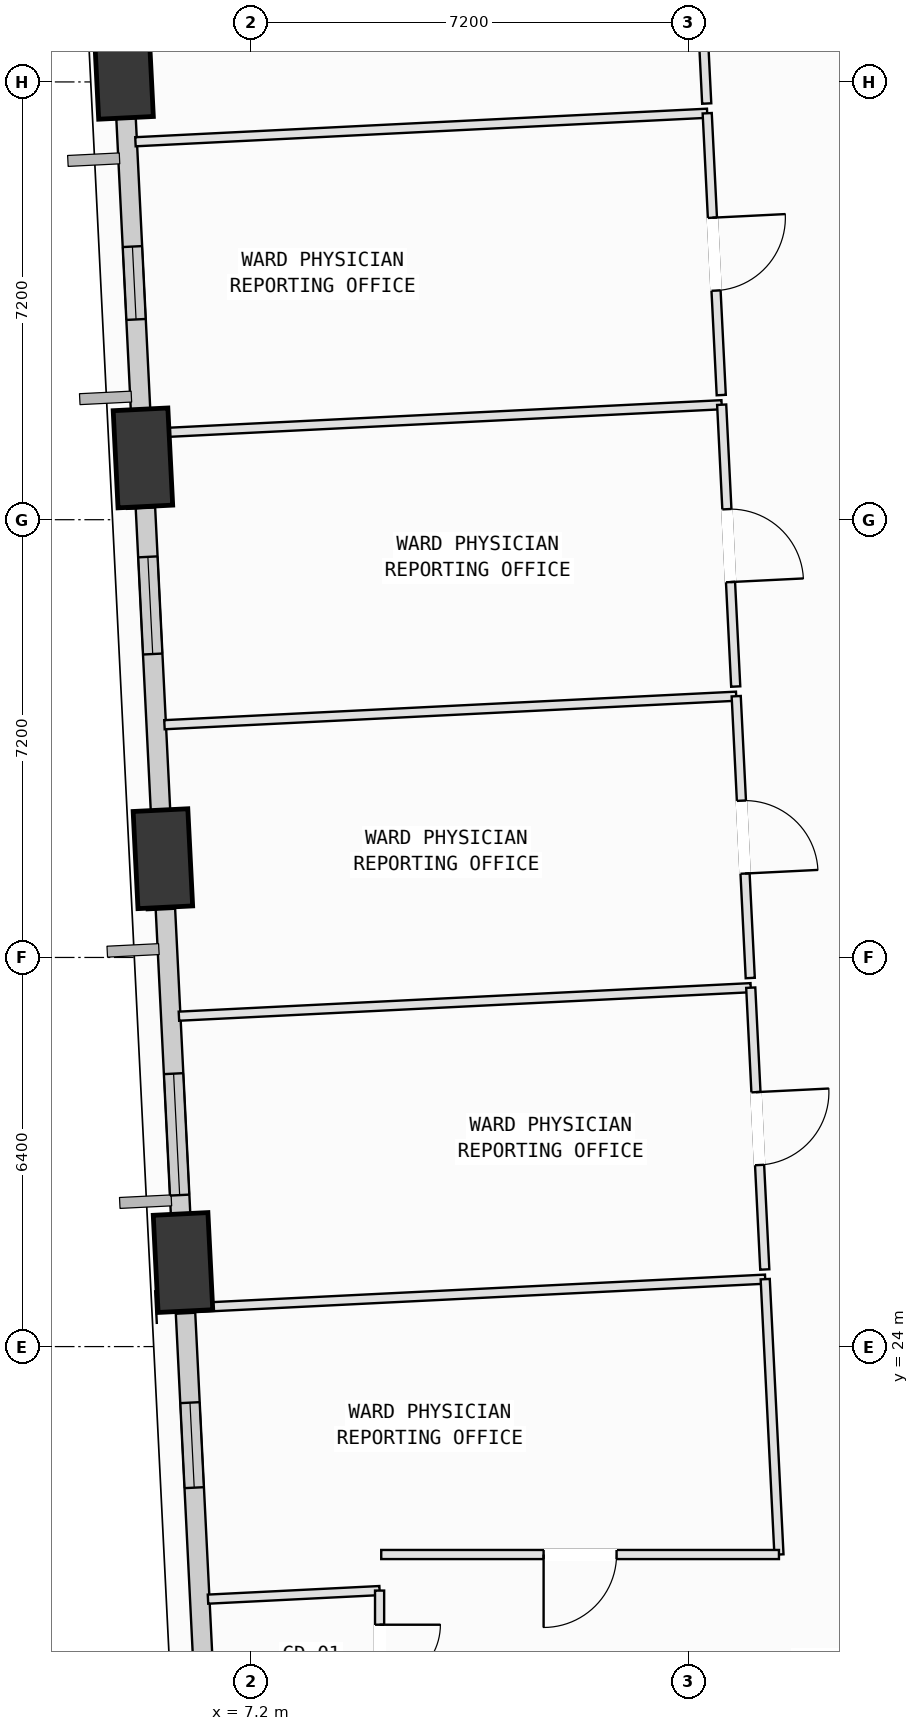
"""IFC4 building model, lengths in metres.
Left out: names, types, materials, properties, quantities, classifications, styles, units other than length and angle.
Written with IfcOpenShell. Run it as: python <this file> out.ifc"""

import sys

from ifc_helpers import new_model, si_unit, direction, frame, frame_2d, origin, origin_2d, place, context, subcontext, project, spatial, rectangle, extrude, element, fill, save


model = new_model("IFC4")
c1 = context("Model", 3, precision=1e-05, world=origin(), true_north=direction((0.0, 1.0)))
c2 = subcontext(c1, "Body", "Model", "MODEL_VIEW")
j1 = project(units=[si_unit("LENGTHUNIT", "METRE"), si_unit("PLANEANGLEUNIT", "RADIAN")], contexts=[c1])
p1 = place(None, origin())
s1 = spatial("IfcSite", under=j1, at=p1, CompositionType="ELEMENT")
p2 = place(p1, origin())
s2 = spatial("IfcBuilding", under=s1, at=p2, CompositionType="ELEMENT")
p3 = place(p2, frame((0.0, 0.0, 35.0)))
s3 = spatial("IfcBuildingStorey", under=s2, at=p3, CompositionType="ELEMENT", Elevation=35.0)
p4 = place(p3, frame((5.11, 45.008, 0.002), z_axis=(-0.081918966219, -0.117588479185, 0.989677842804), x_axis=(0.52422320017, 0.839465927074, 0.143132783408)))
e1 = element("IfcColumn", 1, at=p4, inside=s3, PredefinedType="COLUMN", context=c2, shape_type="SweptSolid", body=[
    extrude(rectangle(XDim=1.6, YDim=0.9, at=origin_2d()), origin(), (0.0, 0.0, 1.0), 4.038),
])
p5 = place(p3, frame((5.428, 38.616, 0.002), z_axis=(-0.055791389838, -0.116307783376, 0.991645007221), x_axis=(0.383527593879, 0.914498520054, 0.128837267713)))
e2 = element("IfcColumn", 2, at=p5, inside=s3, PredefinedType="COLUMN", context=c2, shape_type="SweptSolid", body=[
    extrude(rectangle(XDim=1.6, YDim=0.9, at=origin_2d()), origin(), (0.0, 0.0, 1.0), 4.03),
])
p6 = place(p3, frame((5.756, 32.024, 0.002), z_axis=(-0.028812242657, -0.11488502651, 0.992960867989), x_axis=(0.193019646843, 0.974037670364, 0.118296376293)))
e3 = element("IfcColumn", 3, at=p6, inside=s3, PredefinedType="COLUMN", context=c2, shape_type="SweptSolid", body=[
    extrude(rectangle(XDim=1.6, YDim=0.9, at=origin_2d()), origin(), (0.0, 0.0, 1.0), 4.025),
])
p7 = place(p3, frame((6.087, 25.383, 0.002), z_axis=(-0.001456651927, -0.113315381125, 0.993558001611), x_axis=(-0.036962080994, 0.99288622538, 0.113184575006)))
e4 = element("IfcColumn", 4, at=p7, inside=s3, PredefinedType="COLUMN", context=c2, shape_type="SweptSolid", body=[
    extrude(rectangle(XDim=1.6, YDim=0.9, at=origin_2d()), origin(), (0.0, 0.0, 1.0), 4.022),
])
p8 = place(p3, frame((5.293, 45.269, 0.0), z_axis=(0.0, 0.0, 1.0), x_axis=(0.574655096794, 0.818395698748, 0.0)))
e5 = element("IfcWall", 5, at=p8, inside=s3, PredefinedType="SOLIDWALL", context=c2, shape_type="SweptSolid", body=[
    extrude(rectangle(XDim=3.666, YDim=0.32, at=frame_2d((1.833, 0.0))), origin(), (0.0, 0.0, 1.0), 3.165),
])
p9 = place(p3, frame((5.41, 38.982, 0.0), z_axis=(0.0, 0.0, 1.0), x_axis=(-0.049688162192, 0.998764780385, 0.0)))
e6 = element("IfcWall", 6, at=p9, inside=s3, PredefinedType="SOLIDWALL", context=c2, shape_type="SweptSolid", body=[
    extrude(rectangle(XDim=5.223, YDim=0.32, at=frame_2d((2.611, 0.0))), origin(), (0.0, 0.0, 1.0), 3.165),
])
p10 = place(p9, frame((1.914, 0.0, 0.75)))
e7 = element("IfcOpeningElement", 7, at=p10, cuts=e6, PredefinedType="OPENING", context=c2, shape_type="SweptSolid", body=[
    extrude(rectangle(XDim=1.2, YDim=1.75, at=frame_2d((0.6, 0.875))), frame((0.0, 0.17, 0.0), z_axis=(0.0, -1.0, 0.0), x_axis=(1.0, 0.0, 0.0)), (0.0, 0.0, 1.0), 0.34),
])
p11 = place(p3, frame((5.738, 32.4, 0.0), z_axis=(0.0, 0.0, 1.0), x_axis=(-0.049773021821, 0.998760555037, 0.0)))
e8 = element("IfcWall", 8, at=p11, inside=s3, PredefinedType="SOLIDWALL", context=c2, shape_type="SweptSolid", body=[
    extrude(rectangle(XDim=5.4, YDim=0.32, at=frame_2d((2.7, 0.0))), origin(), (0.0, 0.0, 1.0), 3.165),
])
p12 = place(p11, frame((2.995, 0.0, 0.75)))
e9 = element("IfcOpeningElement", 9, at=p12, cuts=e8, PredefinedType="OPENING", context=c2, shape_type="SweptSolid", body=[
    extrude(rectangle(XDim=1.6, YDim=1.95, at=frame_2d((0.8, 0.975))), frame((0.0, 0.17, 0.0), z_axis=(0.0, -1.0, 0.0), x_axis=(1.0, 0.0, 0.0)), (0.0, 0.0, 1.0), 0.34),
])
p13 = place(p3, frame((6.068, 25.762, 0.0), z_axis=(0.0, 0.0, 1.0), x_axis=(-0.049742813076, 0.998762060026, 0.0)))
e10 = element("IfcWall", 10, at=p13, inside=s3, PredefinedType="SOLIDWALL", context=c2, shape_type="SweptSolid", body=[
    extrude(rectangle(XDim=5.438, YDim=0.32, at=frame_2d((2.719, 0.0))), origin(), (0.0, 0.0, 1.0), 3.165),
])
p14 = place(p13, frame((0.73, 0.0, 0.75)))
e11 = element("IfcOpeningElement", 11, at=p14, cuts=e10, PredefinedType="OPENING", context=c2, shape_type="SweptSolid", body=[
    extrude(rectangle(XDim=2.0, YDim=1.95, at=frame_2d((1.0, 0.975))), frame((0.0, 0.17, 0.0), z_axis=(0.0, -1.0, 0.0), x_axis=(1.0, 0.0, 0.0)), (0.0, 0.0, 1.0), 0.34),
])
p15 = place(p3, frame((6.483, 17.421, 0.0), z_axis=(0.0, 0.0, 1.0), x_axis=(-0.049743098397, 0.998762045816, 0.0)))
e12 = element("IfcWall", 12, at=p15, inside=s3, PredefinedType="SOLIDWALL", context=c2, shape_type="SweptSolid", body=[
    extrude(rectangle(XDim=7.136, YDim=0.32, at=frame_2d((3.568, 0.0))), origin(), (0.0, 0.0, 1.0), 3.165),
])
p16 = place(p15, frame((4.264, 0.0, 0.75)))
e13 = element("IfcOpeningElement", 13, at=p16, cuts=e12, PredefinedType="OPENING", context=c2, shape_type="SweptSolid", body=[
    extrude(rectangle(XDim=1.4, YDim=1.85, at=frame_2d((0.7, 0.925))), frame((0.0, 0.17, 0.0), z_axis=(0.0, -1.0, 0.0), x_axis=(1.0, 0.0, 0.0)), (0.0, 0.0, 1.0), 0.34),
])
p17 = place(p3, frame((6.498, 19.846, 0.0), z_axis=(0.0, 0.0, 1.0), x_axis=(0.998752123395, 0.049941926406, 0.0)))
e14 = element("IfcWall", 14, at=p17, inside=s3, PredefinedType="PARTITIONING", context=c2, shape_type="SweptSolid", body=[
    extrude(rectangle(XDim=2.825, YDim=0.15, at=frame_2d((1.413, 0.0))), origin(), (0.0, 0.0, 1.0), 3.78),
])
p18 = place(p3, frame((9.32, 19.987, 0.0), z_axis=(0.0, 0.0, 1.0), x_axis=(0.0, -1.0, 0.0)))
e15 = element("IfcWall", 15, at=p18, inside=s3, PredefinedType="PARTITIONING", context=c2, shape_type="SweptSolid", body=[
    extrude(rectangle(XDim=2.123, YDim=0.15, at=frame_2d((1.062, 0.0))), origin(), (0.0, 0.0, 1.0), 3.78),
])
p19 = place(p18, frame((0.562, 0.0, 0.0)))
e16 = element("IfcOpeningElement", 16, at=p19, cuts=e15, PredefinedType="OPENING", context=c2, shape_type="SweptSolid", body=[
    extrude(rectangle(XDim=1.0, YDim=2.12, at=frame_2d((0.5, 1.06))), frame((0.0, 0.085, 0.0), z_axis=(0.0, -1.0, 0.0), x_axis=(1.0, 0.0, 0.0)), (0.0, 0.0, 1.0), 0.17),
])
p20 = place(p3, frame((6.229, 24.639, 0.0), z_axis=(0.0, 0.0, 1.0), x_axis=(0.998761218764, 0.049759701489, 0.0)))
e17 = element("IfcWall", 17, at=p20, inside=s3, PredefinedType="PARTITIONING", context=c2, shape_type="SweptSolid", body=[
    extrude(rectangle(XDim=9.445, YDim=0.15, at=frame_2d((4.722, 0.0))), origin(), (0.0, 0.0, 1.0), 3.78),
])
p21 = place(p3, frame((15.662, 25.109, 0.0), z_axis=(0.0, 0.0, 1.0), x_axis=(0.049803348518, -0.998759043251, 0.0)))
e18 = element("IfcWall", 18, at=p21, inside=s3, PredefinedType="PARTITIONING", context=c2, shape_type="SweptSolid", body=[
    extrude(rectangle(XDim=4.534, YDim=0.15, at=frame_2d((2.267, 0.0))), origin(), (0.0, 0.0, 1.0), 3.78),
])
p22 = place(p3, frame((15.888, 20.58, 0.0), z_axis=(0.0, 0.0, 1.0), x_axis=(-1.0, 0.0, 0.0)))
e19 = element("IfcWall", 19, at=p22, inside=s3, PredefinedType="PARTITIONING", context=c2, shape_type="SweptSolid", body=[
    extrude(rectangle(XDim=6.541, YDim=0.15, at=frame_2d((3.271, 0.0))), origin(), (0.0, 0.0, 1.0), 3.78),
])
p23 = place(p22, frame((2.67, 0.0, 0.0)))
e20 = element("IfcOpeningElement", 20, at=p23, cuts=e19, PredefinedType="OPENING", context=c2, shape_type="SweptSolid", body=[
    extrude(rectangle(XDim=1.2, YDim=2.15, at=frame_2d((0.6, 1.075))), frame((0.0, 0.085, 0.0), z_axis=(0.0, -1.0, 0.0), x_axis=(1.0, 0.0, 0.0)), (0.0, 0.0, 1.0), 0.17),
])
p24 = place(p3, frame((6.02, 29.434, 0.0), z_axis=(0.0, 0.0, 1.0), x_axis=(0.998758732093, 0.049809588108, 0.0)))
e21 = element("IfcWall", 21, at=p24, inside=s3, PredefinedType="PARTITIONING", context=c2, shape_type="SweptSolid", body=[
    extrude(rectangle(XDim=9.416, YDim=0.15, at=frame_2d((4.708, 0.0))), origin(), (0.0, 0.0, 1.0), 3.78),
])
p25 = place(p3, frame((15.424, 29.903, 0.0), z_axis=(0.0, 0.0, 1.0), x_axis=(0.049767066936, -0.99876085178, 0.0)))
e22 = element("IfcWall", 22, at=p25, inside=s3, PredefinedType="PARTITIONING", context=c2, shape_type="SweptSolid", body=[
    extrude(rectangle(XDim=4.641, YDim=0.15, at=frame_2d((2.32, 0.0))), origin(), (0.0, 0.0, 1.0), 3.78),
])
p26 = place(p25, frame((1.72, 0.0, 0.0)))
e23 = element("IfcOpeningElement", 23, at=p26, cuts=e22, PredefinedType="OPENING", context=c2, shape_type="SweptSolid", body=[
    extrude(rectangle(XDim=1.2, YDim=2.15, at=frame_2d((0.6, 1.075))), frame((0.0, 0.085, 0.0), z_axis=(0.0, -1.0, 0.0), x_axis=(1.0, 0.0, 0.0)), (0.0, 0.0, 1.0), 0.17),
])
p27 = place(p3, frame((5.887, 24.782, 0.0), z_axis=(0.0, 0.0, 1.0), x_axis=(-0.049322612311, 0.99878289929, 0.0)))
e24 = element("IfcWall", 24, at=p27, inside=s3, PredefinedType="PARTITIONING", context=c2, shape_type="SweptSolid", body=[
    extrude(rectangle(XDim=0.97, YDim=0.15, at=frame_2d((0.485, 0.0))), origin(), (0.0, 0.0, 1.0), 3.165),
])
p28 = place(p3, frame((5.782, 34.228, 0.0), z_axis=(0.0, 0.0, 1.0), x_axis=(0.998758474734, 0.049814748279, 0.0)))
e25 = element("IfcWall", 25, at=p28, inside=s3, PredefinedType="PARTITIONING", context=c2, shape_type="SweptSolid", body=[
    extrude(rectangle(XDim=9.415, YDim=0.15, at=frame_2d((4.708, 0.0))), origin(), (0.0, 0.0, 1.0), 3.78),
])
p29 = place(p3, frame((15.185, 34.697, 0.0), z_axis=(0.0, 0.0, 1.0), x_axis=(0.049767066936, -0.99876085178, 0.0)))
e26 = element("IfcWall", 26, at=p29, inside=s3, PredefinedType="PARTITIONING", context=c2, shape_type="SweptSolid", body=[
    extrude(rectangle(XDim=4.641, YDim=0.15, at=frame_2d((2.32, 0.0))), origin(), (0.0, 0.0, 1.0), 2.865),
])
p30 = place(p29, frame((1.72, 0.0, 0.0)))
e27 = element("IfcOpeningElement", 27, at=p30, cuts=e26, PredefinedType="OPENING", context=c2, shape_type="SweptSolid", body=[
    extrude(rectangle(XDim=1.2, YDim=2.15, at=frame_2d((0.6, 1.075))), frame((0.0, 0.085, 0.0), z_axis=(0.0, -1.0, 0.0), x_axis=(1.0, 0.0, 0.0)), (0.0, 0.0, 1.0), 0.17),
])
p31 = place(p3, frame((5.568, 31.182, 0.0), z_axis=(0.0, 0.0, 1.0), x_axis=(-0.049735941488, 0.998762402238, 0.0)))
e28 = element("IfcWall", 28, at=p31, inside=s3, PredefinedType="PARTITIONING", context=c2, shape_type="SweptSolid", body=[
    extrude(rectangle(XDim=1.208, YDim=0.15, at=frame_2d((0.604, 0.0))), origin(), (0.0, 0.0, 1.0), 3.165),
])
p32 = place(p3, frame((5.543, 39.022, 0.0), z_axis=(0.0, 0.0, 1.0), x_axis=(0.998758474734, 0.049814748279, 0.0)))
e29 = element("IfcWall", 29, at=p32, inside=s3, PredefinedType="PARTITIONING", context=c2, shape_type="SweptSolid", body=[
    extrude(rectangle(XDim=9.415, YDim=0.15, at=frame_2d((4.708, 0.0))), origin(), (0.0, 0.0, 1.0), 3.78),
])
p33 = place(p3, frame((14.946, 39.491, 0.0), z_axis=(0.0, 0.0, 1.0), x_axis=(0.049767066936, -0.99876085178, 0.0)))
e30 = element("IfcWall", 30, at=p33, inside=s3, PredefinedType="PARTITIONING", context=c2, shape_type="SweptSolid", body=[
    extrude(rectangle(XDim=4.641, YDim=0.15, at=frame_2d((2.32, 0.0))), origin(), (0.0, 0.0, 1.0), 2.865),
])
p34 = place(p33, frame((1.72, 0.0, 0.0)))
e31 = element("IfcOpeningElement", 31, at=p34, cuts=e30, PredefinedType="OPENING", context=c2, shape_type="SweptSolid", body=[
    extrude(rectangle(XDim=1.2, YDim=2.15, at=frame_2d((0.6, 1.075))), frame((0.0, 0.085, 0.0), z_axis=(0.0, -1.0, 0.0), x_axis=(1.0, 0.0, 0.0)), (0.0, 0.0, 1.0), 0.17),
])
p35 = place(p3, frame((5.24, 37.782, 0.0), z_axis=(0.0, 0.0, 1.0), x_axis=(-0.049630753106, 0.998767634811, 0.0)))
e32 = element("IfcWall", 32, at=p35, inside=s3, PredefinedType="PARTITIONING", context=c2, shape_type="SweptSolid", body=[
    extrude(rectangle(XDim=1.19, YDim=0.15, at=frame_2d((0.595, 0.0))), origin(), (0.0, 0.0, 1.0), 3.165),
])
p36 = place(p3, frame((5.305, 43.816, 0.0), z_axis=(0.0, 0.0, 1.0), x_axis=(0.998758474734, 0.049814748279, 0.0)))
e33 = element("IfcWall", 33, at=p36, inside=s3, PredefinedType="PARTITIONING", context=c2, shape_type="SweptSolid", body=[
    extrude(rectangle(XDim=9.415, YDim=0.15, at=frame_2d((4.708, 0.0))), origin(), (0.0, 0.0, 1.0), 3.78),
])
p37 = place(p3, frame((14.708, 44.285, 0.0), z_axis=(0.0, 0.0, 1.0), x_axis=(0.049767066936, -0.99876085178, 0.0)))
e34 = element("IfcWall", 34, at=p37, inside=s3, PredefinedType="PARTITIONING", context=c2, shape_type="SweptSolid", body=[
    extrude(rectangle(XDim=4.641, YDim=0.15, at=frame_2d((2.32, 0.0))), origin(), (0.0, 0.0, 1.0), 2.865),
])
p38 = place(p37, frame((1.72, 0.0, 0.0)))
e35 = element("IfcOpeningElement", 35, at=p38, cuts=e34, PredefinedType="OPENING", context=c2, shape_type="SweptSolid", body=[
    extrude(rectangle(XDim=1.2, YDim=2.15, at=frame_2d((0.6, 1.075))), frame((0.0, 0.085, 0.0), z_axis=(0.0, -1.0, 0.0), x_axis=(1.0, 0.0, 0.0)), (0.0, 0.0, 1.0), 0.17),
])
p39 = place(p3, frame((14.465, 49.169, 0.0), z_axis=(0.0, 0.0, 1.0), x_axis=(0.049656995703, -0.998766330419, 0.0)))
e36 = element("IfcWall", 36, at=p39, inside=s3, PredefinedType="PARTITIONING", context=c2, shape_type="SweptSolid", body=[
    extrude(rectangle(XDim=4.73, YDim=0.15, at=frame_2d((2.365, 0.0))), origin(), (0.0, 0.0, 1.0), 3.78),
])
p40 = place(p39, frame((1.89, 0.0, 0.0)))
e37 = element("IfcOpeningElement", 37, at=p40, cuts=e36, PredefinedType="OPENING", context=c2, shape_type="SweptSolid", body=[
    extrude(rectangle(XDim=1.2, YDim=2.15, at=frame_2d((0.6, 1.075))), frame((0.0, 0.085, 0.0), z_axis=(0.0, -1.0, 0.0), x_axis=(1.0, 0.0, 0.0)), (0.0, 0.0, 1.0), 0.17),
])
p41 = place(p3, frame((4.921, 44.187, 0.0), z_axis=(0.0, 0.0, 1.0), x_axis=(-0.049695266708, 0.998764426913, 0.0)))
e38 = element("IfcWall", 38, at=p41, inside=s3, PredefinedType="PARTITIONING", context=c2, shape_type="SweptSolid", body=[
    extrude(rectangle(XDim=2.211, YDim=0.15, at=frame_2d((1.105, 0.0))), origin(), (0.0, 0.0, 1.0), 3.165),
])
p42 = place(p10, origin())
e39 = element("IfcWindow", 39, at=p42, inside=s3, PartitioningType="SINGLE_PANEL", PredefinedType="WINDOW", context=c2, shape_type="SweptSolid", body=[
    extrude(rectangle(XDim=1.2, YDim=1.75, at=frame_2d((0.6, 0.875))), frame((0.0, 0.03, 0.0), z_axis=(0.0, -1.0, 0.0), x_axis=(1.0, 0.0, 0.0)), (0.0, 0.0, 1.0), 0.06),
])
fill(e7, e39)
p43 = place(p12, origin())
e40 = element("IfcWindow", 40, at=p43, inside=s3, PartitioningType="SINGLE_PANEL", PredefinedType="WINDOW", context=c2, shape_type="SweptSolid", body=[
    extrude(rectangle(XDim=1.6, YDim=1.95, at=frame_2d((0.8, 0.975))), frame((0.0, 0.03, 0.0), z_axis=(0.0, -1.0, 0.0), x_axis=(1.0, 0.0, 0.0)), (0.0, 0.0, 1.0), 0.06),
])
fill(e9, e40)
p44 = place(p14, origin())
e41 = element("IfcWindow", 41, at=p44, inside=s3, PartitioningType="SINGLE_PANEL", PredefinedType="WINDOW", context=c2, shape_type="SweptSolid", body=[
    extrude(rectangle(XDim=2.0, YDim=1.95, at=frame_2d((1.0, 0.975))), frame((0.0, 0.03, 0.0), z_axis=(0.0, -1.0, 0.0), x_axis=(1.0, 0.0, 0.0)), (0.0, 0.0, 1.0), 0.06),
])
fill(e11, e41)
p45 = place(p16, origin())
e42 = element("IfcWindow", 42, at=p45, inside=s3, PartitioningType="SINGLE_PANEL", PredefinedType="WINDOW", context=c2, shape_type="SweptSolid", body=[
    extrude(rectangle(XDim=1.4, YDim=1.85, at=frame_2d((0.7, 0.925))), frame((0.0, 0.03, 0.0), z_axis=(0.0, -1.0, 0.0), x_axis=(1.0, 0.0, 0.0)), (0.0, 0.0, 1.0), 0.06),
])
fill(e13, e42)
p46 = place(p19, origin())
e43 = element("IfcDoor", 43, at=p46, inside=s3, OperationType="SINGLE_SWING_LEFT", PredefinedType="DOOR", context=c2, shape_type="SweptSolid", body=[
    extrude(rectangle(XDim=1.0, YDim=2.12, at=frame_2d((0.5, 1.06))), frame((0.0, 0.025, 0.0), z_axis=(0.0, -1.0, 0.0), x_axis=(1.0, 0.0, 0.0)), (0.0, 0.0, 1.0), 0.05),
])
fill(e16, e43)
p47 = place(p23, origin())
e44 = element("IfcDoor", 44, at=p47, inside=s3, OperationType="SINGLE_SWING_RIGHT", PredefinedType="DOOR", context=c2, shape_type="SweptSolid", body=[
    extrude(rectangle(XDim=1.2, YDim=2.15, at=frame_2d((0.6, 1.075))), frame((0.0, 0.025, 0.0), z_axis=(0.0, -1.0, 0.0), x_axis=(1.0, 0.0, 0.0)), (0.0, 0.0, 1.0), 0.05),
])
fill(e20, e44)
p48 = place(p26, origin())
e45 = element("IfcDoor", 45, at=p48, inside=s3, OperationType="SINGLE_SWING_LEFT", PredefinedType="DOOR", context=c2, shape_type="SweptSolid", body=[
    extrude(rectangle(XDim=1.2, YDim=2.15, at=frame_2d((0.6, 1.075))), frame((0.0, 0.025, 0.0), z_axis=(0.0, -1.0, 0.0), x_axis=(1.0, 0.0, 0.0)), (0.0, 0.0, 1.0), 0.05),
])
fill(e23, e45)
p49 = place(p30, origin())
e46 = element("IfcDoor", 46, at=p49, inside=s3, OperationType="SINGLE_SWING_RIGHT", PredefinedType="DOOR", context=c2, shape_type="SweptSolid", body=[
    extrude(rectangle(XDim=1.2, YDim=2.15, at=frame_2d((0.6, 1.075))), frame((0.0, 0.025, 0.0), z_axis=(0.0, -1.0, 0.0), x_axis=(1.0, 0.0, 0.0)), (0.0, 0.0, 1.0), 0.05),
])
fill(e27, e46)
p50 = place(p34, origin())
e47 = element("IfcDoor", 47, at=p50, inside=s3, OperationType="SINGLE_SWING_RIGHT", PredefinedType="DOOR", context=c2, shape_type="SweptSolid", body=[
    extrude(rectangle(XDim=1.2, YDim=2.15, at=frame_2d((0.6, 1.075))), frame((0.0, 0.025, 0.0), z_axis=(0.0, -1.0, 0.0), x_axis=(1.0, 0.0, 0.0)), (0.0, 0.0, 1.0), 0.05),
])
fill(e31, e47)
p51 = place(p38, origin())
e48 = element("IfcDoor", 48, at=p51, inside=s3, OperationType="SINGLE_SWING_LEFT", PredefinedType="DOOR", context=c2, shape_type="SweptSolid", body=[
    extrude(rectangle(XDim=1.2, YDim=2.15, at=frame_2d((0.6, 1.075))), frame((0.0, 0.025, 0.0), z_axis=(0.0, -1.0, 0.0), x_axis=(1.0, 0.0, 0.0)), (0.0, 0.0, 1.0), 0.05),
])
fill(e35, e48)
save(model, sys.argv[1])
